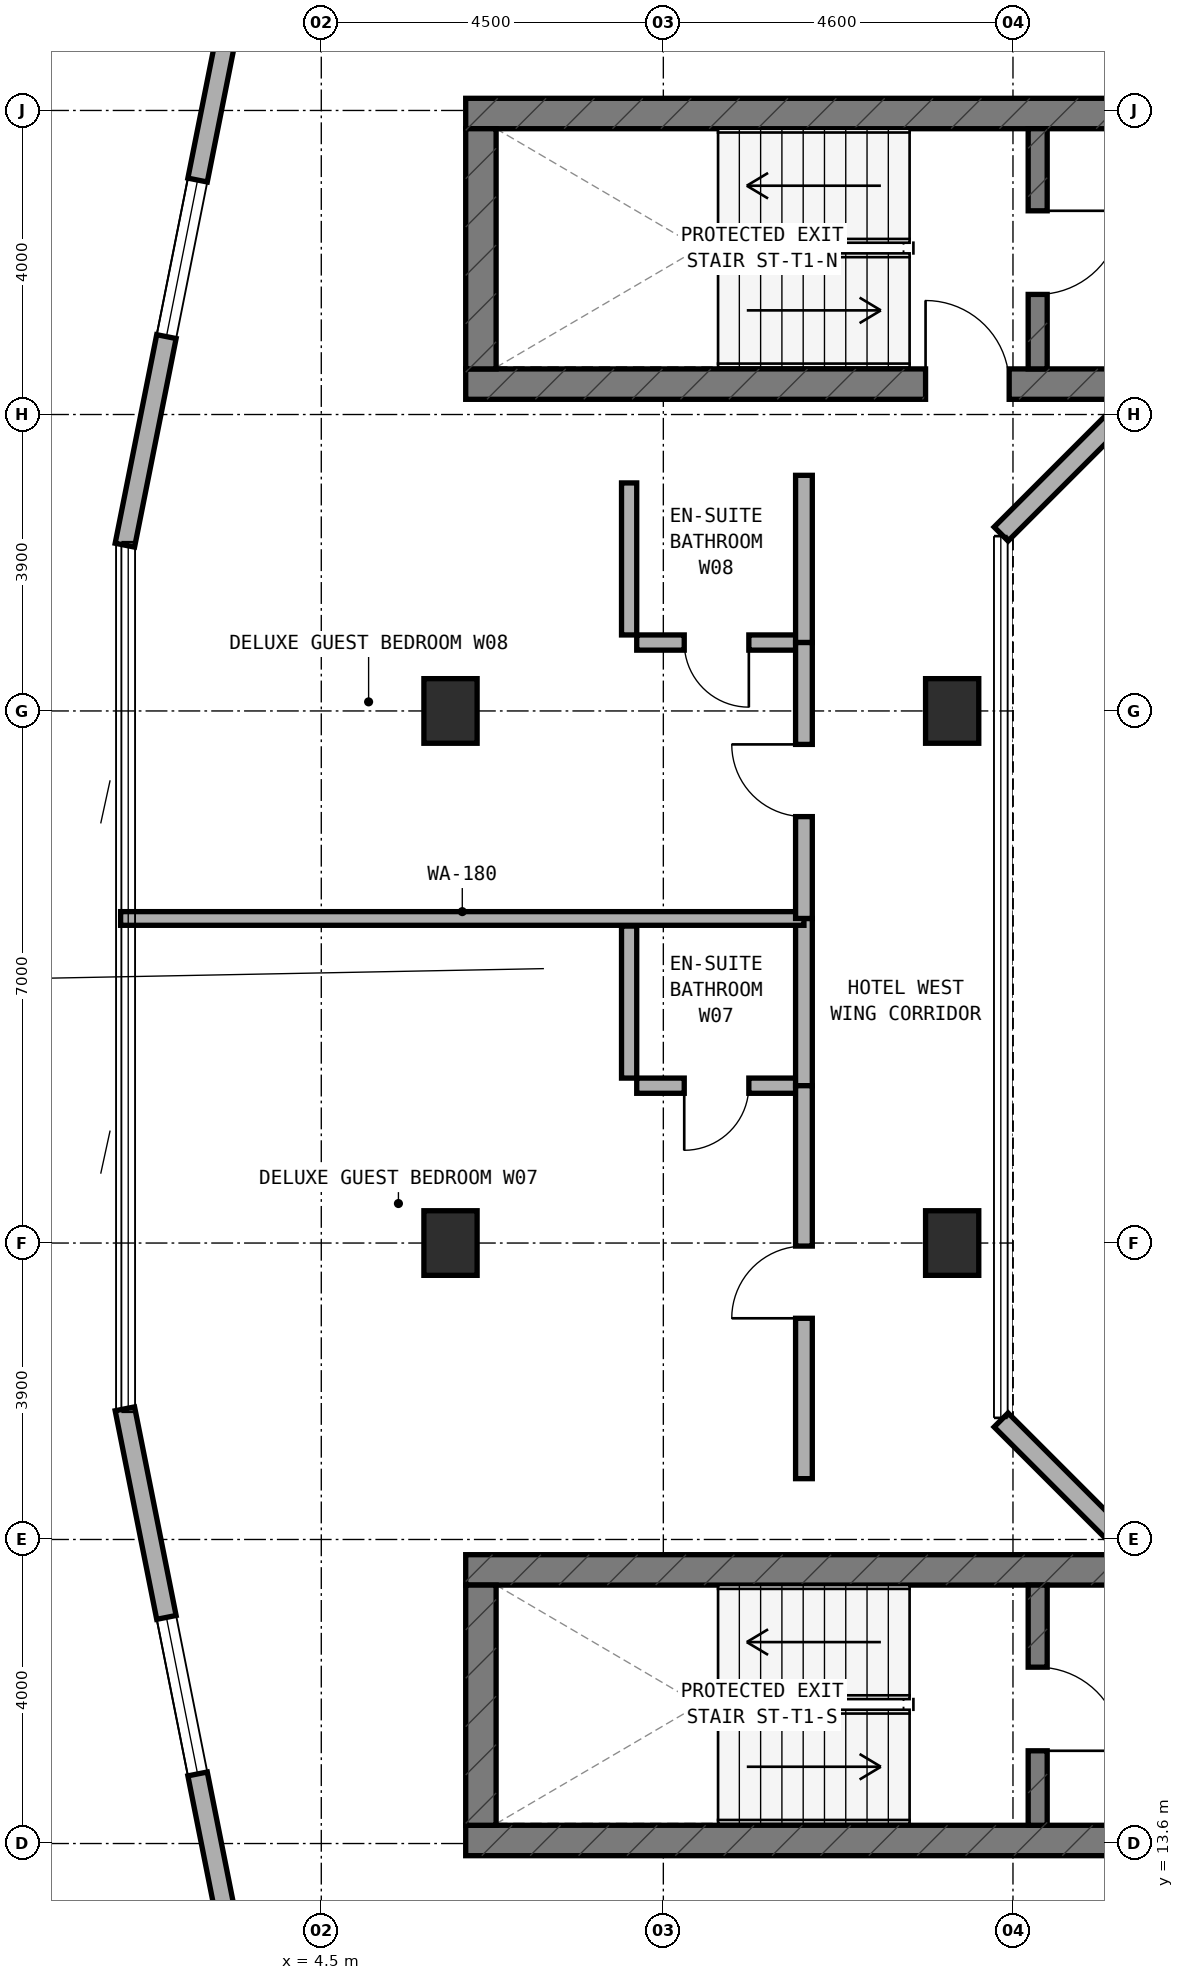
"""IFC4 building model, lengths in metres.
Left out: names, types, materials, properties, quantities, classifications, styles, units other than length and angle.
Written with IfcOpenShell. Run it as: python <this file> out.ifc"""

import sys

from ifc_helpers import new_model, si_unit, direction, frame, frame_2d, origin, origin_2d, place, context, subcontext, project, spatial, rectangle, extrude, element, fill, save


model = new_model("IFC4")
c1 = context("Model", 3, precision=1e-05, world=origin(), true_north=direction((0.0, 1.0)))
c2 = subcontext(c1, "Body", "Model", "MODEL_VIEW")
j1 = project(units=[si_unit("LENGTHUNIT", "METRE"), si_unit("PLANEANGLEUNIT", "RADIAN")], contexts=[c1])
p1 = place(None, origin())
s1 = spatial("IfcSite", under=j1, at=p1, CompositionType="ELEMENT")
p2 = place(p1, origin())
s2 = spatial("IfcBuilding", under=s1, at=p2, CompositionType="ELEMENT")
p3 = place(p2, frame((0.0, 0.0, 199.1)))
s3 = spatial("IfcBuildingStorey", under=s2, at=p3, CompositionType="ELEMENT", Elevation=199.1)
p4 = place(p3, frame((6.4, 32.8, 0.0), z_axis=(0.0, 0.0, 1.0), x_axis=(1.0, 0.0, 0.0)))
e1 = element("IfcWall", 1, at=p4, inside=s3, PredefinedType="SHEAR", context=c2, shape_type="SweptSolid", body=[
    extrude(rectangle(XDim=24.4, YDim=0.4, at=frame_2d((12.2, 0.0))), origin(), (0.0, 0.0, 1.0), 3.6),
])
p5 = place(p4, frame((6.05, 0.0, 0.0)))
e2 = element("IfcOpeningElement", 2, at=p5, cuts=e1, PredefinedType="OPENING", context=c2, shape_type="SweptSolid", body=[
    extrude(rectangle(XDim=1.1, YDim=2.15, at=frame_2d((0.55, 1.075))), frame((0.0, 0.21, 0.0), z_axis=(0.0, -1.0, 0.0), x_axis=(1.0, 0.0, 0.0)), (0.0, 0.0, 1.0), 0.42),
])
p6 = place(p3, frame((6.4, 36.36, 0.0), z_axis=(0.0, 0.0, 1.0), x_axis=(1.0, 0.0, 0.0)))
e3 = element("IfcWall", 3, at=p6, inside=s3, PredefinedType="SHEAR", context=c2, shape_type="SweptSolid", body=[
    extrude(rectangle(XDim=24.4, YDim=0.4, at=frame_2d((12.2, 0.0))), origin(), (0.0, 0.0, 1.0), 3.6),
])
p7 = place(p6, frame((9.15, 0.0, 0.0)))
e4 = element("IfcOpeningElement", 4, at=p7, cuts=e3, PredefinedType="OPENING", context=c2, shape_type="SweptSolid", body=[
    extrude(rectangle(XDim=1.2, YDim=2.15, at=frame_2d((0.6, 1.075))), frame((0.0, 0.21, 0.0), z_axis=(0.0, -1.0, 0.0), x_axis=(1.0, 0.0, 0.0)), (0.0, 0.0, 1.0), 0.42),
])
p8 = place(p6, frame((19.2, 0.0, 0.0)))
e5 = element("IfcOpeningElement", 5, at=p8, cuts=e3, PredefinedType="OPENING", context=c2, shape_type="SweptSolid", body=[
    extrude(rectangle(XDim=0.85, YDim=2.1, at=frame_2d((0.425, 1.05))), frame((0.0, 0.21, 0.0), z_axis=(0.0, -1.0, 0.0), x_axis=(1.0, 0.0, 0.0)), (0.0, 0.0, 1.0), 0.42),
])
p9 = place(p6, frame((16.94, 0.0, 0.0)))
e6 = element("IfcOpeningElement", 6, at=p9, cuts=e3, PredefinedType="OPENING", context=c2, shape_type="SweptSolid", body=[
    extrude(rectangle(XDim=0.85, YDim=2.1, at=frame_2d((0.425, 1.05))), frame((0.0, 0.21, 0.0), z_axis=(0.0, -1.0, 0.0), x_axis=(1.0, 0.0, 0.0)), (0.0, 0.0, 1.0), 0.42),
])
p10 = place(p3, frame((6.6, 33.0, 0.0), z_axis=(0.0, 0.0, 1.0), x_axis=(0.0, 1.0, 0.0)))
e7 = element("IfcWall", 7, at=p10, inside=s3, PredefinedType="SHEAR", context=c2, shape_type="SweptSolid", body=[
    extrude(rectangle(XDim=3.16, YDim=0.4, at=frame_2d((1.58, 0.0))), origin(), (0.0, 0.0, 1.0), 3.6),
])
p11 = place(p3, frame((13.925, 33.0, 0.0), z_axis=(0.0, 0.0, 1.0), x_axis=(0.0, 1.0, 0.0)))
e8 = element("IfcWall", 8, at=p11, inside=s3, PredefinedType="STANDARD", context=c2, shape_type="SweptSolid", body=[
    extrude(rectangle(XDim=3.16, YDim=0.25, at=frame_2d((1.58, 0.0))), origin(), (0.0, 0.0, 1.0), 3.32),
])
p12 = place(p11, frame((0.98, 0.0, 0.0)))
e9 = element("IfcOpeningElement", 9, at=p12, cuts=e8, PredefinedType="OPENING", context=c2, shape_type="SweptSolid", body=[
    extrude(rectangle(XDim=1.1, YDim=2.15, at=frame_2d((0.55, 1.075))), frame((0.0, 0.135, 0.0), z_axis=(0.0, -1.0, 0.0), x_axis=(1.0, 0.0, 0.0)), (0.0, 0.0, 1.0), 0.27),
])
p13 = place(p3, frame((6.4, 13.64, 0.0), z_axis=(0.0, 0.0, 1.0), x_axis=(1.0, 0.0, 0.0)))
e10 = element("IfcWall", 10, at=p13, inside=s3, PredefinedType="SHEAR", context=c2, shape_type="SweptSolid", body=[
    extrude(rectangle(XDim=24.4, YDim=0.4, at=frame_2d((12.2, 0.0))), origin(), (0.0, 0.0, 1.0), 3.6),
])
p14 = place(p13, frame((9.15, 0.0, 0.0)))
e11 = element("IfcOpeningElement", 11, at=p14, cuts=e10, PredefinedType="OPENING", context=c2, shape_type="SweptSolid", body=[
    extrude(rectangle(XDim=1.2, YDim=2.15, at=frame_2d((0.6, 1.075))), frame((0.0, 0.21, 0.0), z_axis=(0.0, -1.0, 0.0), x_axis=(1.0, 0.0, 0.0)), (0.0, 0.0, 1.0), 0.42),
])
p15 = place(p13, frame((16.94, 0.0, 0.0)))
e12 = element("IfcOpeningElement", 12, at=p15, cuts=e10, PredefinedType="OPENING", context=c2, shape_type="SweptSolid", body=[
    extrude(rectangle(XDim=0.85, YDim=2.1, at=frame_2d((0.425, 1.05))), frame((0.0, 0.21, 0.0), z_axis=(0.0, -1.0, 0.0), x_axis=(1.0, 0.0, 0.0)), (0.0, 0.0, 1.0), 0.42),
])
p16 = place(p13, frame((18.783, 0.0, 0.0)))
e13 = element("IfcOpeningElement", 13, at=p16, cuts=e10, PredefinedType="OPENING", context=c2, shape_type="SweptSolid", body=[
    extrude(rectangle(XDim=1.1, YDim=2.15, at=frame_2d((0.55, 1.075))), frame((0.0, 0.21, 0.0), z_axis=(0.0, -1.0, 0.0), x_axis=(1.0, 0.0, 0.0)), (0.0, 0.0, 1.0), 0.42),
])
p17 = place(p13, frame((20.65, 0.0, 0.0)))
e14 = element("IfcOpeningElement", 14, at=p17, cuts=e10, PredefinedType="OPENING", context=c2, shape_type="SweptSolid", body=[
    extrude(rectangle(XDim=1.1, YDim=2.15, at=frame_2d((0.55, 1.075))), frame((0.0, 0.21, 0.0), z_axis=(0.0, -1.0, 0.0), x_axis=(1.0, 0.0, 0.0)), (0.0, 0.0, 1.0), 0.42),
])
p18 = place(p13, frame((22.517, 0.0, 0.0)))
e15 = element("IfcOpeningElement", 15, at=p18, cuts=e10, PredefinedType="OPENING", context=c2, shape_type="SweptSolid", body=[
    extrude(rectangle(XDim=1.1, YDim=2.15, at=frame_2d((0.55, 1.075))), frame((0.0, 0.21, 0.0), z_axis=(0.0, -1.0, 0.0), x_axis=(1.0, 0.0, 0.0)), (0.0, 0.0, 1.0), 0.42),
])
p19 = place(p3, frame((6.4, 17.2, 0.0), z_axis=(0.0, 0.0, 1.0), x_axis=(1.0, 0.0, 0.0)))
e16 = element("IfcWall", 16, at=p19, inside=s3, PredefinedType="SHEAR", context=c2, shape_type="SweptSolid", body=[
    extrude(rectangle(XDim=24.4, YDim=0.4, at=frame_2d((12.2, 0.0))), origin(), (0.0, 0.0, 1.0), 3.6),
])
p20 = place(p3, frame((6.6, 13.84, 0.0), z_axis=(0.0, 0.0, 1.0), x_axis=(0.0, 1.0, 0.0)))
e17 = element("IfcWall", 17, at=p20, inside=s3, PredefinedType="SHEAR", context=c2, shape_type="SweptSolid", body=[
    extrude(rectangle(XDim=3.16, YDim=0.4, at=frame_2d((1.58, 0.0))), origin(), (0.0, 0.0, 1.0), 3.6),
])
p21 = place(p3, frame((13.925, 13.84, 0.0), z_axis=(0.0, 0.0, 1.0), x_axis=(0.0, 1.0, 0.0)))
e18 = element("IfcWall", 18, at=p21, inside=s3, PredefinedType="STANDARD", context=c2, shape_type="SweptSolid", body=[
    extrude(rectangle(XDim=3.16, YDim=0.25, at=frame_2d((1.58, 0.0))), origin(), (0.0, 0.0, 1.0), 3.32),
])
p22 = place(p21, frame((0.98, 0.0, 0.0)))
e19 = element("IfcOpeningElement", 19, at=p22, cuts=e18, PredefinedType="OPENING", context=c2, shape_type="SweptSolid", body=[
    extrude(rectangle(XDim=1.1, YDim=2.15, at=frame_2d((0.55, 1.075))), frame((0.0, 0.135, 0.0), z_axis=(0.0, -1.0, 0.0), x_axis=(1.0, 0.0, 0.0)), (0.0, 0.0, 1.0), 0.27),
])
for number, where, z_axis, x_axis in (
    (20, (6.2, 21.5, 0.0), (0.0, 0.0, 1.0), (1.0, 0.0, 0.0)),
    (21, (6.2, 28.5, 0.0), (0.0, 0.0, 1.0), (1.0, 0.0, 0.0)),
    (22, (12.8, 21.5, 0.0), (0.0, 0.0, 1.0), (1.0, 0.0, 0.0)),
    (23, (12.8, 28.5, 0.0), (0.0, 0.0, 1.0), (1.0, 0.0, 0.0)),
):
    element("IfcColumn", number, at=place(p3, frame(where, z_axis=z_axis, x_axis=x_axis)), inside=s3, PredefinedType="COLUMN", context=c2, shape_type="SweptSolid", body=[
        extrude(rectangle(XDim=0.7, YDim=0.85, at=origin_2d()), origin(), (0.0, 0.0, 1.0), 3.6),
    ])
p23 = place(p3, frame((3.629, 39.283, 0.0), z_axis=(0.0, 0.0, 1.0), x_axis=(-0.195291715883, -0.980745199176, 0.0)))
e24 = element("IfcWall", 24, at=p23, inside=s3, PredefinedType="STANDARD", context=c2, shape_type="SweptSolid", body=[
    extrude(rectangle(XDim=8.771, YDim=0.26, at=frame_2d((4.385, 0.0))), origin(), (0.0, 0.0, 1.0), 3.32),
])
p24 = place(p23, frame((3.873, 0.0, 0.85)))
e25 = element("IfcOpeningElement", 25, at=p24, cuts=e24, PredefinedType="OPENING", context=c2, shape_type="SweptSolid", body=[
    extrude(rectangle(XDim=2.1, YDim=1.5, at=frame_2d((1.05, 0.75))), frame((0.0, 0.14, 0.0), z_axis=(0.0, -1.0, 0.0), x_axis=(1.0, 0.0, 0.0)), (0.0, 0.0, 1.0), 0.28),
])
p25 = place(p3, frame((1.916, 19.319, 0.0), z_axis=(0.0, 0.0, 1.0), x_axis=(0.195291715883, -0.980745199176, 0.0)))
e26 = element("IfcWall", 26, at=p25, inside=s3, PredefinedType="STANDARD", context=c2, shape_type="SweptSolid", body=[
    extrude(rectangle(XDim=8.771, YDim=0.26, at=frame_2d((4.385, 0.0))), origin(), (0.0, 0.0, 1.0), 3.32),
])
p26 = place(p25, frame((2.798, 0.0, 0.85)))
e27 = element("IfcOpeningElement", 27, at=p26, cuts=e26, PredefinedType="OPENING", context=c2, shape_type="SweptSolid", body=[
    extrude(rectangle(XDim=2.1, YDim=1.5, at=frame_2d((1.05, 0.75))), frame((0.0, 0.14, 0.0), z_axis=(0.0, -1.0, 0.0), x_axis=(1.0, 0.0, 0.0)), (0.0, 0.0, 1.0), 0.28),
])
for number, where, z_axis, x_axis in (
    (28, (15.278, 32.662, 0.0), (0.0, 0.0, 1.0), (-0.707, -0.707, 0.0)),
    (29, (13.444, 19.172, 0.0), (0.0, 0.0, 1.0), (0.707, -0.707, 0.0)),
):
    element("IfcWall", number, at=place(p3, frame(where, z_axis=z_axis, x_axis=x_axis)), inside=s3, PredefinedType="STANDARD", context=c2, shape_type="SweptSolid", body=[
        extrude(rectangle(XDim=2.594, YDim=0.26, at=frame_2d((1.297, 0.0))), origin(), (0.0, 0.0, 1.0), 3.32),
    ])
p27 = place(p3, frame((8.65, 23.57, 0.0), z_axis=(0.0, 0.0, 1.0), x_axis=(1.0, 0.0, 0.0)))
e30 = element("IfcWall", 30, at=p27, inside=s3, PredefinedType="PLUMBINGWALL", context=c2, shape_type="SweptSolid", body=[
    extrude(rectangle(XDim=2.1, YDim=0.2, at=frame_2d((1.05, 0.0))), origin(), (0.0, 0.0, 1.0), 3.32),
])
p28 = place(p27, frame((0.625, 0.0, 0.0)))
e31 = element("IfcOpeningElement", 31, at=p28, cuts=e30, PredefinedType="OPENING", context=c2, shape_type="SweptSolid", body=[
    extrude(rectangle(XDim=0.85, YDim=2.1, at=frame_2d((0.425, 1.05))), frame((0.0, 0.11, 0.0), z_axis=(0.0, -1.0, 0.0), x_axis=(1.0, 0.0, 0.0)), (0.0, 0.0, 1.0), 0.22),
])
p29 = place(p3, frame((8.55, 23.67, 0.0), z_axis=(0.0, 0.0, 1.0), x_axis=(0.0, 1.0, 0.0)))
e32 = element("IfcWall", 32, at=p29, inside=s3, PredefinedType="PLUMBINGWALL", context=c2, shape_type="SweptSolid", body=[
    extrude(rectangle(XDim=2.0, YDim=0.2, at=frame_2d((1.0, 0.0))), origin(), (0.0, 0.0, 1.0), 3.32),
])
p30 = place(p3, frame((10.85, 23.57, 0.0), z_axis=(0.0, 0.0, 1.0), x_axis=(0.0, 1.0, 0.0)))
e33 = element("IfcWall", 33, at=p30, inside=s3, PredefinedType="SOLIDWALL", context=c2, shape_type="SweptSolid", body=[
    extrude(rectangle(XDim=2.2, YDim=0.22, at=frame_2d((1.1, 0.0))), origin(), (0.0, 0.0, 1.0), 3.32),
])
p31 = place(p3, frame((10.85, 18.4, 0.0), z_axis=(0.0, 0.0, 1.0), x_axis=(0.0, 1.0, 0.0)))
e34 = element("IfcWall", 34, at=p31, inside=s3, PredefinedType="SOLIDWALL", context=c2, shape_type="SweptSolid", body=[
    extrude(rectangle(XDim=5.17, YDim=0.22, at=frame_2d((2.585, 0.0))), origin(), (0.0, 0.0, 1.0), 2.695),
])
p32 = place(p31, frame((2.11, 0.0, 0.0)))
e35 = element("IfcOpeningElement", 35, at=p32, cuts=e34, PredefinedType="OPENING", context=c2, shape_type="SweptSolid", body=[
    extrude(rectangle(XDim=0.95, YDim=2.1, at=frame_2d((0.475, 1.05))), frame((0.0, 0.12, 0.0), z_axis=(0.0, -1.0, 0.0), x_axis=(1.0, 0.0, 0.0)), (0.0, 0.0, 1.0), 0.24),
])
p33 = place(p3, frame((1.86, 25.77, 0.0), z_axis=(0.0, 0.0, 1.0), x_axis=(1.0, 0.0, 0.0)))
e36 = element("IfcWall", 36, at=p33, inside=s3, PredefinedType="SOLIDWALL", context=c2, shape_type="SweptSolid", body=[
    extrude(rectangle(XDim=8.99, YDim=0.18, at=frame_2d((4.495, 0.0))), origin(), (0.0, 0.0, 1.0), 3.015),
])
p34 = place(p3, frame((8.65, 29.4, 0.0), z_axis=(0.0, 0.0, 1.0), x_axis=(1.0, 0.0, 0.0)))
e37 = element("IfcWall", 37, at=p34, inside=s3, PredefinedType="PLUMBINGWALL", context=c2, shape_type="SweptSolid", body=[
    extrude(rectangle(XDim=2.1, YDim=0.2, at=frame_2d((1.05, 0.0))), origin(), (0.0, 0.0, 1.0), 3.32),
])
p35 = place(p34, frame((0.625, 0.0, 0.0)))
e38 = element("IfcOpeningElement", 38, at=p35, cuts=e37, PredefinedType="OPENING", context=c2, shape_type="SweptSolid", body=[
    extrude(rectangle(XDim=0.85, YDim=2.1, at=frame_2d((0.425, 1.05))), frame((0.0, 0.11, 0.0), z_axis=(0.0, -1.0, 0.0), x_axis=(1.0, 0.0, 0.0)), (0.0, 0.0, 1.0), 0.22),
])
p36 = place(p3, frame((8.55, 29.5, 0.0), z_axis=(0.0, 0.0, 1.0), x_axis=(0.0, 1.0, 0.0)))
e39 = element("IfcWall", 39, at=p36, inside=s3, PredefinedType="PLUMBINGWALL", context=c2, shape_type="SweptSolid", body=[
    extrude(rectangle(XDim=2.0, YDim=0.2, at=frame_2d((1.0, 0.0))), origin(), (0.0, 0.0, 1.0), 3.32),
])
p37 = place(p3, frame((10.85, 29.4, 0.0), z_axis=(0.0, 0.0, 1.0), x_axis=(0.0, 1.0, 0.0)))
e40 = element("IfcWall", 40, at=p37, inside=s3, PredefinedType="SOLIDWALL", context=c2, shape_type="SweptSolid", body=[
    extrude(rectangle(XDim=2.2, YDim=0.22, at=frame_2d((1.1, 0.0))), origin(), (0.0, 0.0, 1.0), 3.32),
])
p38 = place(p3, frame((10.85, 25.77, 0.0), z_axis=(0.0, 0.0, 1.0), x_axis=(0.0, 1.0, 0.0)))
e41 = element("IfcWall", 41, at=p38, inside=s3, PredefinedType="SOLIDWALL", context=c2, shape_type="SweptSolid", body=[
    extrude(rectangle(XDim=3.63, YDim=0.22, at=frame_2d((1.815, 0.0))), origin(), (0.0, 0.0, 1.0), 2.695),
])
p39 = place(p38, frame((1.34, 0.0, 0.0)))
e42 = element("IfcOpeningElement", 42, at=p39, cuts=e41, PredefinedType="OPENING", context=c2, shape_type="SweptSolid", body=[
    extrude(rectangle(XDim=0.95, YDim=2.1, at=frame_2d((0.475, 1.05))), frame((0.0, 0.12, 0.0), z_axis=(0.0, -1.0, 0.0), x_axis=(1.0, 0.0, 0.0)), (0.0, 0.0, 1.0), 0.24),
])
p40 = place(p24, origin())
e43 = element("IfcWindow", 43, at=p40, inside=s3, PartitioningType="SINGLE_PANEL", PredefinedType="WINDOW", context=c2, shape_type="SweptSolid", body=[
    extrude(rectangle(XDim=2.1, YDim=1.5, at=frame_2d((1.05, 0.75))), frame((0.0, 0.03, 0.0), z_axis=(0.0, -1.0, 0.0), x_axis=(1.0, 0.0, 0.0)), (0.0, 0.0, 1.0), 0.06),
])
fill(e25, e43)
p41 = place(p26, origin())
e44 = element("IfcWindow", 44, at=p41, inside=s3, PartitioningType="SINGLE_PANEL", PredefinedType="WINDOW", context=c2, shape_type="SweptSolid", body=[
    extrude(rectangle(XDim=2.1, YDim=1.5, at=frame_2d((1.05, 0.75))), frame((0.0, 0.03, 0.0), z_axis=(0.0, -1.0, 0.0), x_axis=(1.0, 0.0, 0.0)), (0.0, 0.0, 1.0), 0.06),
])
fill(e27, e44)
p42 = place(p12, frame((1.1, 0.0, 0.0), z_axis=(0.0, 0.0, 1.0), x_axis=(-1.0, 0.0, 0.0)))
e45 = element("IfcDoor", 45, at=p42, inside=s3, OperationType="SINGLE_SWING_LEFT", PredefinedType="DOOR", context=c2, shape_type="SweptSolid", body=[
    extrude(rectangle(XDim=1.1, YDim=2.15, at=frame_2d((0.55, 1.075))), frame((0.0, 0.025, 0.0), z_axis=(0.0, -1.0, 0.0), x_axis=(1.0, 0.0, 0.0)), (0.0, 0.0, 1.0), 0.05),
])
fill(e9, e45)
p43 = place(p22, frame((1.1, 0.0, 0.0), z_axis=(0.0, 0.0, 1.0), x_axis=(-1.0, 0.0, 0.0)))
e46 = element("IfcDoor", 46, at=p43, inside=s3, OperationType="SINGLE_SWING_RIGHT", PredefinedType="DOOR", context=c2, shape_type="SweptSolid", body=[
    extrude(rectangle(XDim=1.1, YDim=2.15, at=frame_2d((0.55, 1.075))), frame((0.0, 0.025, 0.0), z_axis=(0.0, -1.0, 0.0), x_axis=(1.0, 0.0, 0.0)), (0.0, 0.0, 1.0), 0.05),
])
fill(e19, e46)
p44 = place(p5, origin())
e47 = element("IfcDoor", 47, at=p44, inside=s3, OperationType="SINGLE_SWING_LEFT", PredefinedType="DOOR", context=c2, shape_type="SweptSolid", body=[
    extrude(rectangle(XDim=1.1, YDim=2.15, at=frame_2d((0.55, 1.075))), frame((0.0, 0.025, 0.0), z_axis=(0.0, -1.0, 0.0), x_axis=(1.0, 0.0, 0.0)), (0.0, 0.0, 1.0), 0.05),
])
fill(e2, e47)
p45 = place(p28, frame((0.85, 0.0, 0.0), z_axis=(0.0, 0.0, 1.0), x_axis=(-1.0, 0.0, 0.0)))
e48 = element("IfcDoor", 48, at=p45, inside=s3, OperationType="SINGLE_SWING_RIGHT", PredefinedType="DOOR", context=c2, shape_type="SweptSolid", body=[
    extrude(rectangle(XDim=0.85, YDim=2.1, at=frame_2d((0.425, 1.05))), frame((0.0, 0.025, 0.0), z_axis=(0.0, -1.0, 0.0), x_axis=(1.0, 0.0, 0.0)), (0.0, 0.0, 1.0), 0.05),
])
fill(e31, e48)
p46 = place(p32, origin())
e49 = element("IfcDoor", 49, at=p46, inside=s3, OperationType="SINGLE_SWING_LEFT", PredefinedType="DOOR", context=c2, shape_type="SweptSolid", body=[
    extrude(rectangle(XDim=0.95, YDim=2.1, at=frame_2d((0.475, 1.05))), frame((0.0, 0.025, 0.0), z_axis=(0.0, -1.0, 0.0), x_axis=(1.0, 0.0, 0.0)), (0.0, 0.0, 1.0), 0.05),
])
fill(e35, e49)
p47 = place(p35, frame((0.85, 0.0, 0.0), z_axis=(0.0, 0.0, 1.0), x_axis=(-1.0, 0.0, 0.0)))
e50 = element("IfcDoor", 50, at=p47, inside=s3, OperationType="SINGLE_SWING_LEFT", PredefinedType="DOOR", context=c2, shape_type="SweptSolid", body=[
    extrude(rectangle(XDim=0.85, YDim=2.1, at=frame_2d((0.425, 1.05))), frame((0.0, 0.025, 0.0), z_axis=(0.0, -1.0, 0.0), x_axis=(1.0, 0.0, 0.0)), (0.0, 0.0, 1.0), 0.05),
])
fill(e38, e50)
p48 = place(p39, origin())
e51 = element("IfcDoor", 51, at=p48, inside=s3, OperationType="SINGLE_SWING_RIGHT", PredefinedType="DOOR", context=c2, shape_type="SweptSolid", body=[
    extrude(rectangle(XDim=0.95, YDim=2.1, at=frame_2d((0.475, 1.05))), frame((0.0, 0.025, 0.0), z_axis=(0.0, -1.0, 0.0), x_axis=(1.0, 0.0, 0.0)), (0.0, 0.0, 1.0), 0.05),
])
fill(e42, e51)
save(model, sys.argv[1])
